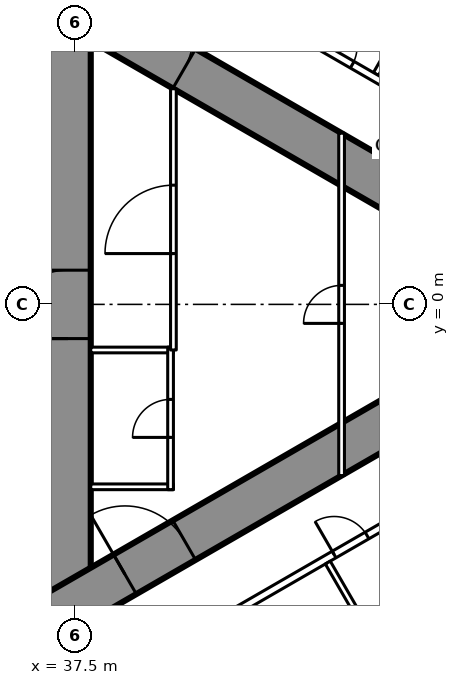
"""IFC4 building model, lengths in metres.
Left out: names, types, materials, properties, quantities, classifications, styles, units other than length and angle.
Written with IfcOpenShell. Run it as: python <this file> out.ifc"""

import sys

from ifc_helpers import new_model, si_unit, direction, frame, frame_2d, origin, place, context, subcontext, project, spatial, rectangle, extrude, element, fill, save


model = new_model("IFC4")
c1 = context("Model", 3, precision=1e-05, world=origin(), true_north=direction((0.0, 1.0)))
c2 = subcontext(c1, "Body", "Model", "MODEL_VIEW")
j1 = project(units=[si_unit("LENGTHUNIT", "METRE"), si_unit("PLANEANGLEUNIT", "RADIAN")], contexts=[c1])
p1 = place(None, origin())
s1 = spatial("IfcSite", under=j1, at=p1, CompositionType="ELEMENT")
p2 = place(p1, origin())
s2 = spatial("IfcBuilding", under=s1, at=p2, CompositionType="ELEMENT")
p3 = place(p2, frame((0.0, 0.0, 39.0)))
s3 = spatial("IfcBuildingStorey", under=s2, at=p3, CompositionType="ELEMENT", Elevation=39.0)
p4 = place(p3, frame((37.3, -8.6, 0.0), z_axis=(0.0, 0.0, 1.0), x_axis=(0.0, 1.0, 0.0)))
e1 = element("IfcWall", 1, at=p4, inside=s3, PredefinedType="SHEAR", context=c2, shape_type="SweptSolid", body=[
    extrude(rectangle(XDim=17.2, YDim=1.2, at=frame_2d((8.6, 0.0))), origin(), (0.0, 0.0, 1.0), 3.5),
])
p5 = place(p4, frame((7.7, 0.0, 0.0)))
e2 = element("IfcOpeningElement", 2, at=p5, cuts=e1, PredefinedType="OPENING", context=c2, shape_type="SweptSolid", body=[
    extrude(rectangle(XDim=1.8, YDim=2.2, at=frame_2d((0.9, 1.1))), frame((0.0, 0.61, 0.0), z_axis=(0.0, -1.0, 0.0), x_axis=(1.0, 0.0, 0.0)), (0.0, 0.0, 1.0), 1.22),
])
p6 = place(p3, frame((27.2, -13.8, 0.0), z_axis=(0.0, 0.0, 1.0), x_axis=(0.866027159892, 0.499996958321, 0.0)))
e3 = element("IfcWall", 3, at=p6, inside=s3, PredefinedType="SHEAR", context=c2, shape_type="SweptSolid", body=[
    extrude(rectangle(XDim=27.947, YDim=1.2, at=frame_2d((13.973, 0.0))), origin(), (0.0, 0.0, 1.0), 3.5),
])
p7 = place(p6, frame((4.6, 0.0, 0.0)))
e4 = element("IfcOpeningElement", 4, at=p7, cuts=e3, PredefinedType="OPENING", context=c2, shape_type="SweptSolid", body=[
    extrude(rectangle(XDim=1.0, YDim=2.2, at=frame_2d((0.5, 1.1))), frame((0.0, 0.61, 0.0), z_axis=(0.0, -1.0, 0.0), x_axis=(1.0, 0.0, 0.0)), (0.0, 0.0, 1.0), 1.22),
])
p8 = place(p6, frame((13.395, 0.0, 0.0)))
e5 = element("IfcOpeningElement", 5, at=p8, cuts=e3, PredefinedType="OPENING", context=c2, shape_type="SweptSolid", body=[
    extrude(rectangle(XDim=1.8, YDim=2.2, at=frame_2d((0.9, 1.1))), frame((0.0, 0.61, 0.0), z_axis=(0.0, -1.0, 0.0), x_axis=(1.0, 0.0, 0.0)), (0.0, 0.0, 1.0), 1.22),
])
p9 = place(p3, frame((27.2, 13.8, 0.0), z_axis=(0.0, 0.0, 1.0), x_axis=(0.866024515034, -0.500001539357, 0.0)))
e6 = element("IfcWall", 6, at=p9, inside=s3, PredefinedType="SHEAR", context=c2, shape_type="SweptSolid", body=[
    extrude(rectangle(XDim=26.907, YDim=1.2, at=frame_2d((13.454, 0.0))), origin(), (0.0, 0.0, 1.0), 3.5),
])
p10 = place(p9, frame((4.6, 0.0, 0.0)))
e7 = element("IfcOpeningElement", 7, at=p10, cuts=e6, PredefinedType="OPENING", context=c2, shape_type="SweptSolid", body=[
    extrude(rectangle(XDim=1.0, YDim=2.2, at=frame_2d((0.5, 1.1))), frame((0.0, 0.61, 0.0), z_axis=(0.0, -1.0, 0.0), x_axis=(1.0, 0.0, 0.0)), (0.0, 0.0, 1.0), 1.22),
])
p11 = place(p9, frame((13.395, 0.0, 0.0)))
e8 = element("IfcOpeningElement", 8, at=p11, cuts=e6, PredefinedType="OPENING", context=c2, shape_type="SweptSolid", body=[
    extrude(rectangle(XDim=1.8, YDim=2.2, at=frame_2d((0.9, 1.1))), frame((0.0, 0.61, 0.0), z_axis=(0.0, -1.0, 0.0), x_axis=(1.0, 0.0, 0.0)), (0.0, 0.0, 1.0), 1.22),
])
p12 = place(p3, frame((45.403, 6.062, 0.0), z_axis=(0.0, 0.0, 1.0), x_axis=(0.500013434677, 0.866017647131, 0.0)))
e9 = element("IfcWall", 9, at=p12, inside=s3, PredefinedType="PARTITIONING", context=c2, shape_type="SweptSolid", body=[
    extrude(rectangle(XDim=9.902, YDim=0.15, at=frame_2d((4.951, 0.0))), origin(), (0.0, 0.0, 1.0), 2.25),
])
p13 = place(p3, frame((37.96, -10.243, 0.0), z_axis=(0.0, 0.0, 1.0), x_axis=(0.866026429433, 0.499998223521, 0.0)))
e10 = element("IfcWall", 10, at=p13, inside=s3, PredefinedType="PARTITIONING", context=c2, shape_type="SweptSolid", body=[
    extrude(rectangle(XDim=20.487, YDim=0.2, at=frame_2d((10.243, 0.0))), origin(), (0.0, 0.0, 1.0), 3.25),
])
p14 = place(p13, frame((7.325, 0.0, 0.0)))
e11 = element("IfcOpeningElement", 11, at=p14, cuts=e10, PredefinedType="OPENING", context=c2, shape_type="SweptSolid", body=[
    extrude(rectangle(XDim=1.0, YDim=2.2, at=frame_2d((0.5, 1.1))), frame((0.0, 0.11, 0.0), z_axis=(0.0, -1.0, 0.0), x_axis=(1.0, 0.0, 0.0)), (0.0, 0.0, 1.0), 0.22),
])
p15 = place(p13, frame((18.937, 0.0, 0.0)))
e12 = element("IfcOpeningElement", 12, at=p15, cuts=e10, PredefinedType="OPENING", context=c2, shape_type="SweptSolid", body=[
    extrude(rectangle(XDim=0.95, YDim=2.2, at=frame_2d((0.475, 1.1))), frame((0.0, 0.11, 0.0), z_axis=(0.0, -1.0, 0.0), x_axis=(1.0, 0.0, 0.0)), (0.0, 0.0, 1.0), 0.22),
])
p16 = place(p13, frame((0.6, 0.0, 0.0)))
e13 = element("IfcOpeningElement", 13, at=p16, cuts=e10, PredefinedType="OPENING", context=c2, shape_type="SweptSolid", body=[
    extrude(rectangle(XDim=0.95, YDim=2.2, at=frame_2d((0.475, 1.1))), frame((0.0, 0.11, 0.0), z_axis=(0.0, -1.0, 0.0), x_axis=(1.0, 0.0, 0.0)), (0.0, 0.0, 1.0), 0.22),
])
p17 = place(p3, frame((36.834, 10.894, 0.0), z_axis=(0.0, 0.0, 1.0), x_axis=(0.866028157229, -0.499995230863, 0.0)))
e14 = element("IfcWall", 14, at=p17, inside=s3, PredefinedType="PARTITIONING", context=c2, shape_type="SweptSolid", body=[
    extrude(rectangle(XDim=21.667, YDim=0.2, at=frame_2d((10.833, 0.0))), origin(), (0.0, 0.0, 1.0), 3.25),
])
p18 = place(p17, frame((18.885, 0.0, 0.0)))
e15 = element("IfcOpeningElement", 15, at=p18, cuts=e14, PredefinedType="OPENING", context=c2, shape_type="SweptSolid", body=[
    extrude(rectangle(XDim=0.95, YDim=2.2, at=frame_2d((0.475, 1.1))), frame((0.0, 0.11, 0.0), z_axis=(0.0, -1.0, 0.0), x_axis=(1.0, 0.0, 0.0)), (0.0, 0.0, 1.0), 0.22),
])
p19 = place(p17, frame((10.212, 0.0, 0.0)))
e16 = element("IfcOpeningElement", 16, at=p19, cuts=e14, PredefinedType="OPENING", context=c2, shape_type="SweptSolid", body=[
    extrude(rectangle(XDim=0.95, YDim=2.2, at=frame_2d((0.475, 1.1))), frame((0.0, 0.11, 0.0), z_axis=(0.0, -1.0, 0.0), x_axis=(1.0, 0.0, 0.0)), (0.0, 0.0, 1.0), 0.22),
])
p20 = place(p17, frame((8.225, 0.0, 0.0)))
e17 = element("IfcOpeningElement", 17, at=p20, cuts=e14, PredefinedType="OPENING", context=c2, shape_type="SweptSolid", body=[
    extrude(rectangle(XDim=0.95, YDim=2.2, at=frame_2d((0.475, 1.1))), frame((0.0, 0.11, 0.0), z_axis=(0.0, -1.0, 0.0), x_axis=(1.0, 0.0, 0.0)), (0.0, 0.0, 1.0), 0.22),
])
p21 = place(p17, frame((1.825, 0.0, 0.0)))
e18 = element("IfcOpeningElement", 18, at=p21, cuts=e14, PredefinedType="OPENING", context=c2, shape_type="SweptSolid", body=[
    extrude(rectangle(XDim=0.95, YDim=2.2, at=frame_2d((0.475, 1.1))), frame((0.0, 0.11, 0.0), z_axis=(0.0, -1.0, 0.0), x_axis=(1.0, 0.0, 0.0)), (0.0, 0.0, 1.0), 0.22),
])
p22 = place(p17, frame((0.246, 0.0, 0.0)))
e19 = element("IfcOpeningElement", 19, at=p22, cuts=e14, PredefinedType="OPENING", context=c2, shape_type="SweptSolid", body=[
    extrude(rectangle(XDim=0.9, YDim=2.2, at=frame_2d((0.45, 1.1))), frame((0.0, 0.11, 0.0), z_axis=(0.0, -1.0, 0.0), x_axis=(1.0, 0.0, 0.0)), (0.0, 0.0, 1.0), 0.22),
])
p23 = place(p3, frame((44.137, -6.792, 0.0), z_axis=(0.0, 0.0, 1.0), x_axis=(0.49994636267, -0.866056369097, 0.0)))
e20 = element("IfcWall", 20, at=p23, inside=s3, PredefinedType="PARTITIONING", context=c2, shape_type="SweptSolid", body=[
    extrude(rectangle(XDim=2.8, YDim=0.15, at=frame_2d((1.4, 0.0))), origin(), (0.0, 0.0, 1.0), 3.25),
])
p24 = place(p23, frame((1.55, 0.0, 0.0)))
e21 = element("IfcOpeningElement", 21, at=p24, cuts=e20, PredefinedType="OPENING", context=c2, shape_type="SweptSolid", body=[
    extrude(rectangle(XDim=1.0, YDim=2.2, at=frame_2d((0.5, 1.1))), frame((0.0, 0.085, 0.0), z_axis=(0.0, -1.0, 0.0), x_axis=(1.0, 0.0, 0.0)), (0.0, 0.0, 1.0), 0.17),
])
for number, where, z_axis, x_axis in (
    (22, (37.9, -1.2, 0.0), (0.0, 0.0, 1.0), (1.0, 0.0, 0.0)),
    (23, (37.9, -4.8, 0.0), (0.0, 0.0, 1.0), (1.0, 0.0, 0.0)),
):
    element("IfcWall", number, at=place(p3, frame(where, z_axis=z_axis, x_axis=x_axis)), inside=s3, PredefinedType="PARTITIONING", context=c2, shape_type="SweptSolid", body=[
        extrude(rectangle(XDim=2.175, YDim=0.15, at=frame_2d((1.087, 0.0))), origin(), (0.0, 0.0, 1.0), 3.25),
    ])
p25 = place(p3, frame((40.0, -4.875, 0.0), z_axis=(0.0, 0.0, 1.0), x_axis=(0.0, 1.0, 0.0)))
e24 = element("IfcWall", 24, at=p25, inside=s3, PredefinedType="PARTITIONING", context=c2, shape_type="SweptSolid", body=[
    extrude(rectangle(XDim=3.75, YDim=0.15, at=frame_2d((1.875, 0.0))), origin(), (0.0, 0.0, 1.0), 3.25),
])
p26 = place(p25, frame((1.375, 0.0, 0.0)))
e25 = element("IfcOpeningElement", 25, at=p26, cuts=e24, PredefinedType="OPENING", context=c2, shape_type="SweptSolid", body=[
    extrude(rectangle(XDim=1.0, YDim=2.2, at=frame_2d((0.5, 1.1))), frame((0.0, 0.085, 0.0), z_axis=(0.0, -1.0, 0.0), x_axis=(1.0, 0.0, 0.0)), (0.0, 0.0, 1.0), 0.17),
])
p27 = place(p3, frame((40.075, -1.2, 0.0), z_axis=(0.0, 0.0, 1.0), x_axis=(0.0, 1.0, 0.0)))
e26 = element("IfcWall", 26, at=p27, inside=s3, PredefinedType="PARTITIONING", context=c2, shape_type="SweptSolid", body=[
    extrude(rectangle(XDim=6.874, YDim=0.15, at=frame_2d((3.437, 0.0))), origin(), (0.0, 0.0, 1.0), 3.25),
])
p28 = place(p27, frame((2.537, 0.0, 0.0)))
e27 = element("IfcOpeningElement", 27, at=p28, cuts=e26, PredefinedType="OPENING", context=c2, shape_type="SweptSolid", body=[
    extrude(rectangle(XDim=1.8, YDim=2.2, at=frame_2d((0.9, 1.1))), frame((0.0, 0.085, 0.0), z_axis=(0.0, -1.0, 0.0), x_axis=(1.0, 0.0, 0.0)), (0.0, 0.0, 1.0), 0.17),
])
p29 = place(p3, frame((44.5, -4.505, 0.0), z_axis=(0.0, 0.0, 1.0), x_axis=(0.0, 1.0, 0.0)))
e28 = element("IfcWall", 28, at=p29, inside=s3, PredefinedType="PARTITIONING", context=c2, shape_type="SweptSolid", body=[
    extrude(rectangle(XDim=9.009, YDim=0.15, at=frame_2d((4.505, 0.0))), origin(), (0.0, 0.0, 1.0), 2.45),
])
p30 = place(p29, frame((4.005, 0.0, 0.0)))
e29 = element("IfcOpeningElement", 29, at=p30, cuts=e28, PredefinedType="OPENING", context=c2, shape_type="SweptSolid", body=[
    extrude(rectangle(XDim=1.0, YDim=2.2, at=frame_2d((0.5, 1.1))), frame((0.0, 0.085, 0.0), z_axis=(0.0, -1.0, 0.0), x_axis=(1.0, 0.0, 0.0)), (0.0, 0.0, 1.0), 0.17),
])
p31 = place(p14, origin())
e30 = element("IfcDoor", 30, at=p31, inside=s3, OperationType="SINGLE_SWING_LEFT", PredefinedType="DOOR", context=c2, shape_type="SweptSolid", body=[
    extrude(rectangle(XDim=1.0, YDim=2.2, at=frame_2d((0.5, 1.1))), frame((0.0, 0.025, 0.0), z_axis=(0.0, -1.0, 0.0), x_axis=(1.0, 0.0, 0.0)), (0.0, 0.0, 1.0), 0.05),
])
fill(e11, e30)
p32 = place(p20, origin())
e31 = element("IfcDoor", 31, at=p32, inside=s3, OperationType="SINGLE_SWING_LEFT", PredefinedType="DOOR", context=c2, shape_type="SweptSolid", body=[
    extrude(rectangle(XDim=0.95, YDim=2.2, at=frame_2d((0.475, 1.1))), frame((0.0, 0.025, 0.0), z_axis=(0.0, -1.0, 0.0), x_axis=(1.0, 0.0, 0.0)), (0.0, 0.0, 1.0), 0.05),
])
fill(e17, e31)
p33 = place(p26, origin())
e32 = element("IfcDoor", 32, at=p33, inside=s3, OperationType="SINGLE_SWING_LEFT", PredefinedType="DOOR", context=c2, shape_type="SweptSolid", body=[
    extrude(rectangle(XDim=1.0, YDim=2.2, at=frame_2d((0.5, 1.1))), frame((0.0, 0.025, 0.0), z_axis=(0.0, -1.0, 0.0), x_axis=(1.0, 0.0, 0.0)), (0.0, 0.0, 1.0), 0.05),
])
fill(e25, e32)
p34 = place(p28, origin())
e33 = element("IfcDoor", 33, at=p34, inside=s3, OperationType="DOUBLE_DOOR_SINGLE_SWING", PredefinedType="DOOR", context=c2, shape_type="SweptSolid", body=[
    extrude(rectangle(XDim=1.8, YDim=2.2, at=frame_2d((0.9, 1.1))), frame((0.0, 0.025, 0.0), z_axis=(0.0, -1.0, 0.0), x_axis=(1.0, 0.0, 0.0)), (0.0, 0.0, 1.0), 0.05),
])
fill(e27, e33)
p35 = place(p30, origin())
e34 = element("IfcDoor", 34, at=p35, inside=s3, OperationType="SINGLE_SWING_LEFT", PredefinedType="DOOR", context=c2, shape_type="SweptSolid", body=[
    extrude(rectangle(XDim=1.0, YDim=2.2, at=frame_2d((0.5, 1.1))), frame((0.0, 0.025, 0.0), z_axis=(0.0, -1.0, 0.0), x_axis=(1.0, 0.0, 0.0)), (0.0, 0.0, 1.0), 0.05),
])
fill(e29, e34)
p36 = place(p8, origin())
e35 = element("IfcDoor", 35, at=p36, inside=s3, OperationType="DOUBLE_DOOR_SINGLE_SWING", PredefinedType="DOOR", context=c2, shape_type="SweptSolid", body=[
    extrude(rectangle(XDim=1.8, YDim=2.2, at=frame_2d((0.9, 1.1))), frame((0.0, 0.025, 0.0), z_axis=(0.0, -1.0, 0.0), x_axis=(1.0, 0.0, 0.0)), (0.0, 0.0, 1.0), 0.05),
])
fill(e5, e35)
p37 = place(p11, origin())
e36 = element("IfcDoor", 36, at=p37, inside=s3, OperationType="DOUBLE_DOOR_SINGLE_SWING", PredefinedType="DOOR", context=c2, shape_type="SweptSolid", body=[
    extrude(rectangle(XDim=1.8, YDim=2.2, at=frame_2d((0.9, 1.1))), frame((0.0, 0.025, 0.0), z_axis=(0.0, -1.0, 0.0), x_axis=(1.0, 0.0, 0.0)), (0.0, 0.0, 1.0), 0.05),
])
fill(e8, e36)
p38 = place(p5, origin())
e37 = element("IfcDoor", 37, at=p38, inside=s3, OperationType="DOUBLE_DOOR_SINGLE_SWING", PredefinedType="DOOR", context=c2, shape_type="SweptSolid", body=[
    extrude(rectangle(XDim=1.8, YDim=2.2, at=frame_2d((0.9, 1.1))), frame((0.0, 0.025, 0.0), z_axis=(0.0, -1.0, 0.0), x_axis=(1.0, 0.0, 0.0)), (0.0, 0.0, 1.0), 0.05),
])
fill(e2, e37)
save(model, sys.argv[1])
